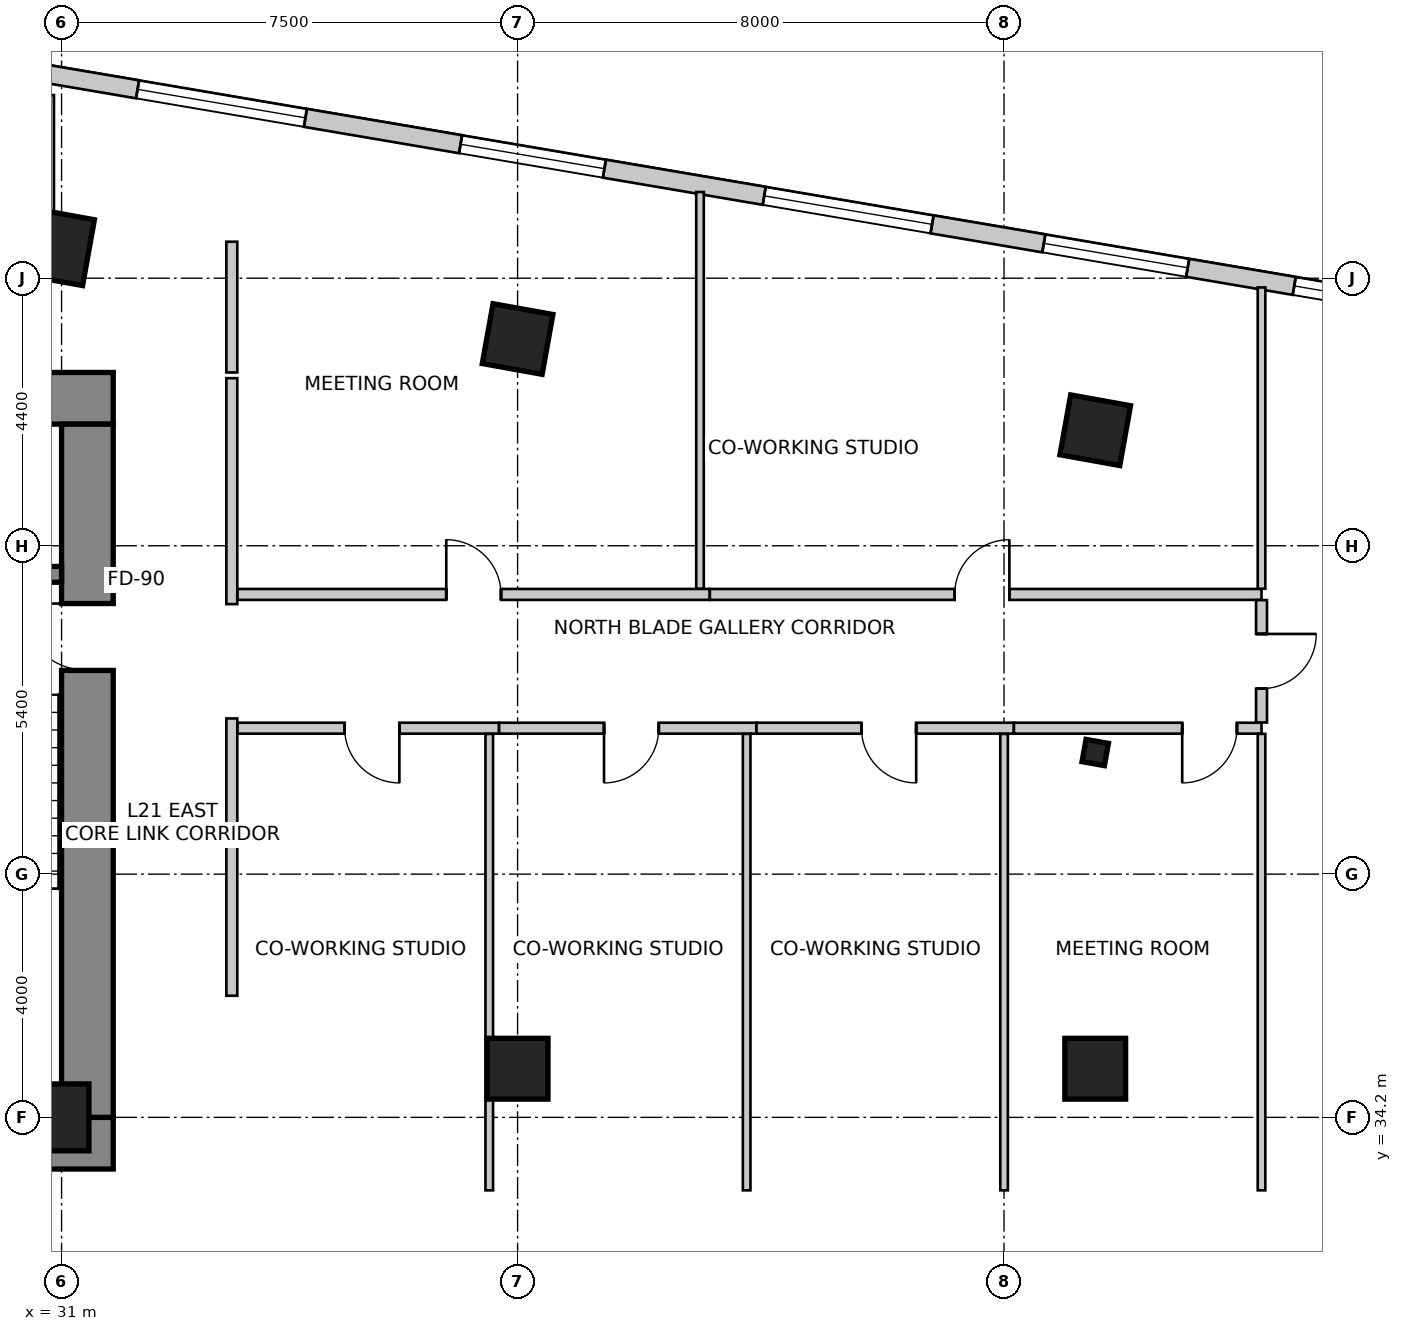
"""IFC4 building model, lengths in metres.
Left out: names, types, materials, properties, quantities, classifications, styles, units other than length and angle.
Written with IfcOpenShell. Run it as: python <this file> out.ifc"""

import sys

from ifc_helpers import new_model, si_unit, direction, frame, frame_2d, origin, origin_2d, place, context, subcontext, project, spatial, rectangle, i_section, extrude, source, transform, mapped, element, fill, save


model = new_model("IFC4")
c1 = context("Model", 3, precision=1e-05, world=origin(), true_north=direction((0.0, 1.0)))
c2 = subcontext(c1, "Body", "Model", "MODEL_VIEW")
j1 = project(units=[si_unit("LENGTHUNIT", "METRE"), si_unit("PLANEANGLEUNIT", "RADIAN")], contexts=[c1])
p1 = place(None, origin())
s1 = spatial("IfcSite", under=j1, at=p1, CompositionType="ELEMENT")
p2 = place(p1, origin())
s2 = spatial("IfcBuilding", under=s1, at=p2, CompositionType="ELEMENT")
p3 = place(p2, frame((0.0, 0.0, 87.0)))
s3 = spatial("IfcBuildingStorey", under=s2, at=p3, CompositionType="ELEMENT", Elevation=87.0)
p4 = place(p3, frame((15.75, 46.025, 0.0), z_axis=(0.0, 0.0, 1.0), x_axis=(1.0, 0.0, 0.0)))
e1 = element("IfcWall", 1, at=p4, inside=s3, PredefinedType="SHEAR", context=c2, shape_type="SweptSolid", body=[
    extrude(rectangle(XDim=16.1, YDim=0.85, at=frame_2d((8.05, 0.0))), origin(), (0.0, 0.0, 1.0), 4.0),
])
p5 = place(p3, frame((15.75, 33.775, 0.0), z_axis=(0.0, 0.0, 1.0), x_axis=(1.0, 0.0, 0.0)))
e2 = element("IfcWall", 2, at=p5, inside=s3, PredefinedType="SHEAR", context=c2, shape_type="SweptSolid", body=[
    extrude(rectangle(XDim=16.1, YDim=0.85, at=frame_2d((8.05, 0.0))), origin(), (0.0, 0.0, 1.0), 4.0),
])
m1 = source(origin(), c2, "Body", "SweptSolid", [
    extrude(rectangle(XDim=1.3, YDim=2.15, at=frame_2d((0.65, 1.075))), frame((0.0, 0.435, 0.0), z_axis=(0.0, -1.0, 0.0), x_axis=(1.0, 0.0, 0.0)), (0.0, 0.0, 1.0), 0.87),
])
p6 = place(p5, frame((10.18, 0.0, 0.0)))
e3 = element("IfcOpeningElement", 3, at=p6, cuts=e2, PredefinedType="OPENING", context=c2, shape_type="MappedRepresentation", body=[
    mapped(m1, transform((0.0, 0.0, 0.0), scale=1.0)),
])
p7 = place(p3, frame((31.425, 34.2, 0.0), z_axis=(0.0, 0.0, 1.0), x_axis=(0.0, 1.0, 0.0)))
e4 = element("IfcWall", 4, at=p7, inside=s3, PredefinedType="SHEAR", context=c2, shape_type="SweptSolid", body=[
    extrude(rectangle(XDim=11.4, YDim=0.85, at=frame_2d((5.7, 0.0))), origin(), (0.0, 0.0, 1.0), 4.0),
])
m2 = source(origin(), c2, "Body", "SweptSolid", [
    extrude(rectangle(XDim=1.1, YDim=2.15, at=frame_2d((0.55, 1.075))), frame((0.0, 0.435, 0.0), z_axis=(0.0, -1.0, 0.0), x_axis=(1.0, 0.0, 0.0)), (0.0, 0.0, 1.0), 0.87),
])
p8 = place(p7, frame((7.35, 0.0, 0.0)))
e5 = element("IfcOpeningElement", 5, at=p8, cuts=e4, PredefinedType="OPENING", context=c2, shape_type="MappedRepresentation", body=[
    mapped(m2, transform((0.0, 0.0, 0.0), scale=1.0)),
])
p9 = place(p3, frame((27.5, 43.13, 0.0), z_axis=(0.0, 0.0, 1.0), x_axis=(1.0, 0.0, 0.0)))
e6 = element("IfcWall", 6, at=p9, inside=s3, PredefinedType="SHEAR", context=c2, shape_type="SweptSolid", body=[
    extrude(rectangle(XDim=3.5, YDim=0.26, at=frame_2d((1.75, 0.0))), origin(), (0.0, 0.0, 1.0), 4.0),
])
m3 = source(origin(), c2, "Body", "SweptSolid", [
    extrude(rectangle(XDim=0.9, YDim=1.1, at=origin_2d()), origin(), (0.0, 0.0, 1.0), 4.0),
])
p10 = place(p3, frame((31.0, 48.5, 0.0), z_axis=(0.0, 0.0, 1.0), x_axis=(0.984195607969, -0.17708474032, 0.0)))
e7 = element("IfcColumn", 7, at=p10, inside=s3, PredefinedType="COLUMN", context=c2, shape_type="MappedRepresentation", body=[
    mapped(m3, transform((0.0, 0.0, 0.0), scale=1.0)),
])
m4 = source(origin(), c2, "Body", "SweptSolid", [
    extrude(rectangle(XDim=1.0, YDim=1.0, at=origin_2d()), origin(), (0.0, 0.0, 1.0), 4.0),
])
for number, where, z_axis, x_axis in (
    (8, (38.5, 47.0, 0.0), (0.0, 0.0, 1.0), (0.984, -0.177, 0.0)),
    (9, (48.0, 45.5, 0.0), (0.0, 0.0, 1.0), (0.984, -0.177, 0.0)),
):
    element("IfcColumn", number, at=place(p3, frame(where, z_axis=z_axis, x_axis=x_axis)), inside=s3, PredefinedType="COLUMN", context=c2, shape_type="MappedRepresentation", body=[
        mapped(m4, transform((0.0, 0.0, 0.0), scale=1.0)),
    ])
p11 = place(p3, frame((31.0, 34.2, 0.0), z_axis=(0.0, 0.0, 1.0), x_axis=(1.0, 0.0, 0.0)))
e10 = element("IfcColumn", 10, at=p11, inside=s3, PredefinedType="COLUMN", context=c2, shape_type="MappedRepresentation", body=[
    mapped(m3, transform((0.0, 0.0, 0.0), scale=1.0)),
])
for number, where, z_axis, x_axis in (
    (11, (38.5, 35.0, 0.0), (0.0, 0.0, 1.0), (1.0, 0.0, 0.0)),
    (12, (48.0, 35.0, 0.0), (0.0, 0.0, 1.0), (1.0, 0.0, 0.0)),
):
    element("IfcColumn", number, at=place(p3, frame(where, z_axis=z_axis, x_axis=x_axis)), inside=s3, PredefinedType="COLUMN", context=c2, shape_type="MappedRepresentation", body=[
        mapped(m4, transform((0.0, 0.0, 0.0), scale=1.0)),
    ])
m5 = source(origin(), c2, "Body", "SweptSolid", [
    extrude(i_section(OverallWidth=0.374, OverallDepth=0.372, WebThickness=0.016, FlangeThickness=0.026, FilletRadius=0.015, at=origin_2d()), origin(), (0.0, 0.0, 1.0), 4.0),
])
p12 = place(p3, frame((48.0, 40.2, 0.0), z_axis=(0.0, 0.0, 1.0), x_axis=(0.984195607969, -0.17708474032, 0.0)))
e13 = element("IfcColumn", 13, at=p12, inside=s3, PredefinedType="COLUMN", context=c2, shape_type="MappedRepresentation", body=[
    mapped(m5, transform((0.0, 0.0, 0.0), scale=1.0)),
])
p13 = place(p3, frame((53.961, 47.417, 0.0), z_axis=(0.0, 0.0, 1.0), x_axis=(-0.985865713455, 0.167537443678, 0.0)))
e14 = element("IfcWall", 14, at=p13, inside=s3, PredefinedType="SOLIDWALL", context=c2, shape_type="SweptSolid", body=[
    extrude(rectangle(XDim=32.537, YDim=0.3, at=frame_2d((16.269, 0.0))), origin(), (0.0, 0.0, 1.0), 3.75),
])
m6 = source(origin(), c2, "Body", "SweptSolid", [
    extrude(rectangle(XDim=2.1, YDim=2.0, at=frame_2d((1.05, 1.0))), frame((0.0, 0.16, 0.0), z_axis=(0.0, -1.0, 0.0), x_axis=(1.0, 0.0, 0.0)), (0.0, 0.0, 1.0), 0.32),
])
p14 = place(p13, frame((0.626, 0.0, 0.85)))
e15 = element("IfcOpeningElement", 15, at=p14, cuts=e14, PredefinedType="OPENING", context=c2, shape_type="MappedRepresentation", body=[
    mapped(m6, transform((0.0, 0.0, 0.0), scale=1.0)),
])
m7 = source(origin(), c2, "Body", "SweptSolid", [
    extrude(rectangle(XDim=2.4, YDim=2.2, at=frame_2d((1.2, 1.1))), frame((0.0, 0.16, 0.0), z_axis=(0.0, -1.0, 0.0), x_axis=(1.0, 0.0, 0.0)), (0.0, 0.0, 1.0), 0.32),
])
p15 = place(p13, frame((4.504, 0.0, 0.85)))
e16 = element("IfcOpeningElement", 16, at=p15, cuts=e14, PredefinedType="OPENING", context=c2, shape_type="MappedRepresentation", body=[
    mapped(m7, transform((0.0, 0.0, 0.0), scale=1.0)),
])
m8 = source(origin(), c2, "Body", "SweptSolid", [
    extrude(rectangle(XDim=2.8, YDim=2.4, at=frame_2d((1.4, 1.2))), frame((0.0, 0.16, 0.0), z_axis=(0.0, -1.0, 0.0), x_axis=(1.0, 0.0, 0.0)), (0.0, 0.0, 1.0), 0.32),
])
p16 = place(p13, frame((8.768, 0.0, 0.85)))
e17 = element("IfcOpeningElement", 17, at=p16, cuts=e14, PredefinedType="OPENING", context=c2, shape_type="MappedRepresentation", body=[
    mapped(m8, transform((0.0, 0.0, 0.0), scale=1.0)),
])
p17 = place(p13, frame((14.234, 0.0, 0.85)))
e18 = element("IfcOpeningElement", 18, at=p17, cuts=e14, PredefinedType="OPENING", context=c2, shape_type="MappedRepresentation", body=[
    mapped(m7, transform((0.0, 0.0, 0.0), scale=1.0)),
])
p18 = place(p13, frame((19.222, 0.0, 0.85)))
e19 = element("IfcOpeningElement", 19, at=p18, cuts=e14, PredefinedType="OPENING", context=c2, shape_type="MappedRepresentation", body=[
    mapped(m8, transform((0.0, 0.0, 0.0), scale=1.0)),
])
p19 = place(p13, frame((25.095, 0.0, 0.85)))
e20 = element("IfcOpeningElement", 20, at=p19, cuts=e14, PredefinedType="OPENING", context=c2, shape_type="MappedRepresentation", body=[
    mapped(m7, transform((0.0, 0.0, 0.0), scale=1.0)),
])
p20 = place(p13, frame((29.595, 0.0, 0.85)))
e21 = element("IfcOpeningElement", 21, at=p20, cuts=e14, PredefinedType="OPENING", context=c2, shape_type="MappedRepresentation", body=[
    mapped(m7, transform((0.0, 0.0, 0.0), scale=1.0)),
])
p21 = place(p3, frame((25.362, 48.6, 0.0), z_axis=(0.0, 0.0, 1.0), x_axis=(1.0, 0.0, 0.0)))
e22 = element("IfcWall", 22, at=p21, inside=s3, PredefinedType="PARTITIONING", context=c2, shape_type="SweptSolid", body=[
    extrude(rectangle(XDim=5.598, YDim=0.18, at=frame_2d((2.799, 0.0))), origin(), (0.0, 0.0, 1.0), 2.892),
])
m9 = source(origin(), c2, "Body", "SweptSolid", [
    extrude(rectangle(XDim=0.9, YDim=2.15, at=frame_2d((0.45, 1.075))), frame((0.0, 0.1, 0.0), z_axis=(0.0, -1.0, 0.0), x_axis=(1.0, 0.0, 0.0)), (0.0, 0.0, 1.0), 0.2),
])
p22 = place(p21, frame((2.349, 0.0, 0.0)))
e23 = element("IfcOpeningElement", 23, at=p22, cuts=e22, PredefinedType="OPENING", context=c2, shape_type="MappedRepresentation", body=[
    mapped(m9, transform((0.0, 0.0, 0.0), scale=1.0)),
])
p23 = place(p3, frame((33.8, 48.6, 0.0), z_axis=(0.0, 0.0, 1.0), x_axis=(0.0, -1.0, 0.0)))
e24 = element("IfcWall", 24, at=p23, inside=s3, PredefinedType="PARTITIONING", context=c2, shape_type="SweptSolid", body=[
    extrude(rectangle(XDim=2.15, YDim=0.18, at=frame_2d((1.075, 0.0))), origin(), (0.0, 0.0, 1.0), 2.892),
])
p24 = place(p3, frame((33.8, 40.76, 0.0), z_axis=(0.0, 0.0, 1.0), x_axis=(0.0, -1.0, 0.0)))
e25 = element("IfcWall", 25, at=p24, inside=s3, PredefinedType="PARTITIONING", context=c2, shape_type="SweptSolid", body=[
    extrude(rectangle(XDim=4.56, YDim=0.18, at=frame_2d((2.28, 0.0))), origin(), (0.0, 0.0, 1.0), 3.75),
])
p25 = place(p3, frame((33.8, 46.356, 0.0), z_axis=(0.0, 0.0, 1.0), x_axis=(0.0, -1.0, 0.0)))
e26 = element("IfcWall", 26, at=p25, inside=s3, PredefinedType="PARTITIONING", context=c2, shape_type="SweptSolid", body=[
    extrude(rectangle(XDim=3.716, YDim=0.18, at=frame_2d((1.858, 0.0))), origin(), (0.0, 0.0, 1.0), 3.188),
])
p26 = place(p3, frame((38.194, 40.6, 0.0), z_axis=(0.0, 0.0, 1.0), x_axis=(-1.0, 0.0, 0.0)))
e27 = element("IfcWall", 27, at=p26, inside=s3, PredefinedType="PARTITIONING", context=c2, shape_type="SweptSolid", body=[
    extrude(rectangle(XDim=4.3, YDim=0.18, at=frame_2d((2.15, 0.0))), origin(), (0.0, 0.0, 1.0), 3.335),
])
p27 = place(p26, frame((1.638, 0.0, 0.0)))
e28 = element("IfcOpeningElement", 28, at=p27, cuts=e27, PredefinedType="OPENING", context=c2, shape_type="MappedRepresentation", body=[
    mapped(m9, transform((0.0, 0.0, 0.0), scale=1.0)),
])
p28 = place(p3, frame((42.427, 40.6, 0.0), z_axis=(0.0, 0.0, 1.0), x_axis=(-1.0, 0.0, 0.0)))
e29 = element("IfcWall", 29, at=p28, inside=s3, PredefinedType="PARTITIONING", context=c2, shape_type="SweptSolid", body=[
    extrude(rectangle(XDim=4.231, YDim=0.18, at=frame_2d((2.115, 0.0))), origin(), (0.0, 0.0, 1.0), 3.125),
])
p29 = place(p28, frame((1.605, 0.0, 0.0)))
e30 = element("IfcOpeningElement", 30, at=p29, cuts=e29, PredefinedType="OPENING", context=c2, shape_type="MappedRepresentation", body=[
    mapped(m9, transform((0.0, 0.0, 0.0), scale=1.0)),
])
p30 = place(p3, frame((46.661, 40.6, 0.0), z_axis=(0.0, 0.0, 1.0), x_axis=(-1.0, 0.0, 0.0)))
e31 = element("IfcWall", 31, at=p30, inside=s3, PredefinedType="PARTITIONING", context=c2, shape_type="SweptSolid", body=[
    extrude(rectangle(XDim=4.232, YDim=0.18, at=frame_2d((2.116, 0.0))), origin(), (0.0, 0.0, 1.0), 3.188),
])
p31 = place(p30, frame((1.606, 0.0, 0.0)))
e32 = element("IfcOpeningElement", 32, at=p31, cuts=e31, PredefinedType="OPENING", context=c2, shape_type="MappedRepresentation", body=[
    mapped(m9, transform((0.0, 0.0, 0.0), scale=1.0)),
])
p32 = place(p3, frame((50.735, 40.6, 0.0), z_axis=(0.0, 0.0, 1.0), x_axis=(-1.0, 0.0, 0.0)))
e33 = element("IfcWall", 33, at=p32, inside=s3, PredefinedType="PARTITIONING", context=c2, shape_type="SweptSolid", body=[
    extrude(rectangle(XDim=4.072, YDim=0.18, at=frame_2d((2.036, 0.0))), origin(), (0.0, 0.0, 1.0), 3.125),
])
p33 = place(p32, frame((0.404, 0.0, 0.0)))
e34 = element("IfcOpeningElement", 34, at=p33, cuts=e33, PredefinedType="OPENING", context=c2, shape_type="MappedRepresentation", body=[
    mapped(m9, transform((0.0, 0.0, 0.0), scale=1.0)),
])
p34 = place(p3, frame((33.894, 42.8, 0.0), z_axis=(0.0, 0.0, 1.0), x_axis=(1.0, 0.0, 0.0)))
e35 = element("IfcWall", 35, at=p34, inside=s3, PredefinedType="PARTITIONING", context=c2, shape_type="SweptSolid", body=[
    extrude(rectangle(XDim=7.766, YDim=0.18, at=frame_2d((3.883, 0.0))), origin(), (0.0, 0.0, 1.0), 3.125),
])
p35 = place(p34, frame((3.433, 0.0, 0.0)))
e36 = element("IfcOpeningElement", 36, at=p35, cuts=e35, PredefinedType="OPENING", context=c2, shape_type="MappedRepresentation", body=[
    mapped(m9, transform((0.0, 0.0, 0.0), scale=1.0)),
])
p36 = place(p3, frame((41.662, 42.8, 0.0), z_axis=(0.0, 0.0, 1.0), x_axis=(1.0, 0.0, 0.0)))
e37 = element("IfcWall", 37, at=p36, inside=s3, PredefinedType="PARTITIONING", context=c2, shape_type="SweptSolid", body=[
    extrude(rectangle(XDim=9.073, YDim=0.18, at=frame_2d((4.537, 0.0))), origin(), (0.0, 0.0, 1.0), 3.125),
])
p37 = place(p36, frame((4.026, 0.0, 0.0)))
e38 = element("IfcOpeningElement", 38, at=p37, cuts=e37, PredefinedType="OPENING", context=c2, shape_type="MappedRepresentation", body=[
    mapped(m9, transform((0.0, 0.0, 0.0), scale=1.0)),
])
p38 = place(p3, frame((50.735, 42.706, 0.0), z_axis=(0.0, 0.0, 1.0), x_axis=(0.0, -1.0, 0.0)))
e39 = element("IfcWall", 39, at=p38, inside=s3, PredefinedType="PARTITIONING", context=c2, shape_type="SweptSolid", body=[
    extrude(rectangle(XDim=2.012, YDim=0.18, at=frame_2d((1.006, 0.0))), origin(), (0.0, 0.0, 1.0), 3.75),
])
p39 = place(p38, frame((0.556, 0.0, 0.0)))
e40 = element("IfcOpeningElement", 40, at=p39, cuts=e39, PredefinedType="OPENING", context=c2, shape_type="MappedRepresentation", body=[
    mapped(m9, transform((0.0, 0.0, 0.0), scale=1.0)),
])
p40 = place(p3, frame((38.034, 40.506, 0.0), z_axis=(0.0, 0.0, 1.0), x_axis=(0.0, -1.0, 0.0)))
e41 = element("IfcWall", 41, at=p40, inside=s3, PredefinedType="PARTITIONING", context=c2, shape_type="SweptSolid", body=[
    extrude(rectangle(XDim=7.506, YDim=0.125, at=frame_2d((3.753, 0.0))), origin(), (0.0, 0.0, 1.0), 3.335),
])
for number, where, z_axis, x_axis in (
    (42, (42.267, 40.506, 0.0), (0.0, 0.0, 1.0), (0.0, -1.0, 0.0)),
    (43, (46.501, 40.506, 0.0), (0.0, 0.0, 1.0), (0.0, -1.0, 0.0)),
):
    element("IfcWall", number, at=place(p3, frame(where, z_axis=z_axis, x_axis=x_axis)), inside=s3, PredefinedType="PARTITIONING", context=c2, shape_type="SweptSolid", body=[
        extrude(rectangle(XDim=7.506, YDim=0.125, at=frame_2d((3.753, 0.0))), origin(), (0.0, 0.0, 1.0), 2.892),
    ])
p41 = place(p3, frame((50.735, 40.506, 0.0), z_axis=(0.0, 0.0, 1.0), x_axis=(0.0, -1.0, 0.0)))
e44 = element("IfcWall", 44, at=p41, inside=s3, PredefinedType="PARTITIONING", context=c2, shape_type="SweptSolid", body=[
    extrude(rectangle(XDim=7.506, YDim=0.125, at=frame_2d((3.753, 0.0))), origin(), (0.0, 0.0, 1.0), 3.75),
])
p42 = place(p3, frame((41.5, 49.417, 0.0), z_axis=(0.0, 0.0, 1.0), x_axis=(0.0, -1.0, 0.0)))
e45 = element("IfcWall", 45, at=p42, inside=s3, PredefinedType="PARTITIONING", context=c2, shape_type="SweptSolid", body=[
    extrude(rectangle(XDim=6.523, YDim=0.125, at=frame_2d((3.262, 0.0))), origin(), (0.0, 0.0, 1.0), 2.892),
])
p43 = place(p3, frame((50.735, 47.848, 0.0), z_axis=(0.0, 0.0, 1.0), x_axis=(0.0, -1.0, 0.0)))
e46 = element("IfcWall", 46, at=p43, inside=s3, PredefinedType="PARTITIONING", context=c2, shape_type="SweptSolid", body=[
    extrude(rectangle(XDim=4.954, YDim=0.125, at=frame_2d((2.477, 0.0))), origin(), (0.0, 0.0, 1.0), 3.75),
])
p44 = place(p3, frame((30.8, 51.013, 0.0), z_axis=(0.0, 0.0, 1.0), x_axis=(0.0, -1.0, 0.0)))
e47 = element("IfcWall", 47, at=p44, inside=s3, PredefinedType="PARTITIONING", context=c2, shape_type="SweptSolid", body=[
    extrude(rectangle(XDim=2.193, YDim=0.15, at=frame_2d((1.096, 0.0))), origin(), (0.0, 0.0, 1.0), 3.75),
])
m10 = source(origin(), c2, "Body", "SweptSolid", [
    extrude(rectangle(XDim=2.1, YDim=2.0, at=frame_2d((1.05, 1.0))), frame((0.0, -0.015, 0.0), z_axis=(0.0, -1.0, 0.0), x_axis=(1.0, 0.0, 0.0)), (0.0, 0.0, 1.0), 0.06),
])
p45 = place(p14, origin())
e48 = element("IfcWindow", 48, at=p45, inside=s3, PartitioningType="SINGLE_PANEL", PredefinedType="WINDOW", context=c2, shape_type="MappedRepresentation", body=[
    mapped(m10, transform((0.0, 0.0, 0.0), scale=1.0)),
])
fill(e15, e48)
m11 = source(origin(), c2, "Body", "SweptSolid", [
    extrude(rectangle(XDim=2.4, YDim=2.2, at=frame_2d((1.2, 1.1))), frame((0.0, -0.015, 0.0), z_axis=(0.0, -1.0, 0.0), x_axis=(1.0, 0.0, 0.0)), (0.0, 0.0, 1.0), 0.06),
])
p46 = place(p15, origin())
e49 = element("IfcWindow", 49, at=p46, inside=s3, PartitioningType="SINGLE_PANEL", PredefinedType="WINDOW", context=c2, shape_type="MappedRepresentation", body=[
    mapped(m11, transform((0.0, 0.0, 0.0), scale=1.0)),
])
fill(e16, e49)
m12 = source(origin(), c2, "Body", "SweptSolid", [
    extrude(rectangle(XDim=2.8, YDim=2.4, at=frame_2d((1.4, 1.2))), frame((0.0, -0.015, 0.0), z_axis=(0.0, -1.0, 0.0), x_axis=(1.0, 0.0, 0.0)), (0.0, 0.0, 1.0), 0.06),
])
p47 = place(p16, origin())
e50 = element("IfcWindow", 50, at=p47, inside=s3, PartitioningType="SINGLE_PANEL", PredefinedType="WINDOW", context=c2, shape_type="MappedRepresentation", body=[
    mapped(m12, transform((0.0, 0.0, 0.0), scale=1.0)),
])
fill(e17, e50)
p48 = place(p17, origin())
e51 = element("IfcWindow", 51, at=p48, inside=s3, PartitioningType="SINGLE_PANEL", PredefinedType="WINDOW", context=c2, shape_type="MappedRepresentation", body=[
    mapped(m11, transform((0.0, 0.0, 0.0), scale=1.0)),
])
fill(e18, e51)
p49 = place(p18, origin())
e52 = element("IfcWindow", 52, at=p49, inside=s3, PartitioningType="SINGLE_PANEL", PredefinedType="WINDOW", context=c2, shape_type="MappedRepresentation", body=[
    mapped(m12, transform((0.0, 0.0, 0.0), scale=1.0)),
])
fill(e19, e52)
m13 = source(origin(), c2, "Body", "SweptSolid", [
    extrude(rectangle(XDim=1.1, YDim=2.15, at=frame_2d((0.55, 1.075))), frame((0.0, 0.025, 0.0), z_axis=(0.0, -1.0, 0.0), x_axis=(1.0, 0.0, 0.0)), (0.0, 0.0, 1.0), 0.05),
])
p50 = place(p8, origin())
e53 = element("IfcDoor", 53, at=p50, inside=s3, OperationType="SINGLE_SWING_RIGHT", PredefinedType="DOOR", context=c2, shape_type="MappedRepresentation", body=[
    mapped(m13, transform((0.0, 0.0, 0.0), scale=1.0)),
])
fill(e5, e53)
m14 = source(origin(), c2, "Body", "SweptSolid", [
    extrude(rectangle(XDim=0.9, YDim=2.15, at=frame_2d((0.45, 1.075))), frame((0.0, 0.025, 0.0), z_axis=(0.0, -1.0, 0.0), x_axis=(1.0, 0.0, 0.0)), (0.0, 0.0, 1.0), 0.05),
])
p51 = place(p27, origin())
e54 = element("IfcDoor", 54, at=p51, inside=s3, OperationType="SINGLE_SWING_LEFT", PredefinedType="DOOR", context=c2, shape_type="MappedRepresentation", body=[
    mapped(m14, transform((0.0, 0.0, 0.0), scale=1.0)),
])
fill(e28, e54)
p52 = place(p29, origin())
e55 = element("IfcDoor", 55, at=p52, inside=s3, OperationType="SINGLE_SWING_RIGHT", PredefinedType="DOOR", context=c2, shape_type="MappedRepresentation", body=[
    mapped(m14, transform((0.0, 0.0, 0.0), scale=1.0)),
])
fill(e30, e55)
p53 = place(p31, origin())
e56 = element("IfcDoor", 56, at=p53, inside=s3, OperationType="SINGLE_SWING_LEFT", PredefinedType="DOOR", context=c2, shape_type="MappedRepresentation", body=[
    mapped(m14, transform((0.0, 0.0, 0.0), scale=1.0)),
])
fill(e32, e56)
p54 = place(p33, origin())
e57 = element("IfcDoor", 57, at=p54, inside=s3, OperationType="SINGLE_SWING_RIGHT", PredefinedType="DOOR", context=c2, shape_type="MappedRepresentation", body=[
    mapped(m14, transform((0.0, 0.0, 0.0), scale=1.0)),
])
fill(e34, e57)
p55 = place(p35, origin())
e58 = element("IfcDoor", 58, at=p55, inside=s3, OperationType="SINGLE_SWING_LEFT", PredefinedType="DOOR", context=c2, shape_type="MappedRepresentation", body=[
    mapped(m14, transform((0.0, 0.0, 0.0), scale=1.0)),
])
fill(e36, e58)
p56 = place(p37, origin())
e59 = element("IfcDoor", 59, at=p56, inside=s3, OperationType="SINGLE_SWING_RIGHT", PredefinedType="DOOR", context=c2, shape_type="MappedRepresentation", body=[
    mapped(m14, transform((0.0, 0.0, 0.0), scale=1.0)),
])
fill(e38, e59)
p57 = place(p39, origin())
e60 = element("IfcDoor", 60, at=p57, inside=s3, OperationType="SINGLE_SWING_LEFT", PredefinedType="DOOR", context=c2, shape_type="MappedRepresentation", body=[
    mapped(m14, transform((0.0, 0.0, 0.0), scale=1.0)),
])
fill(e40, e60)
save(model, sys.argv[1])
